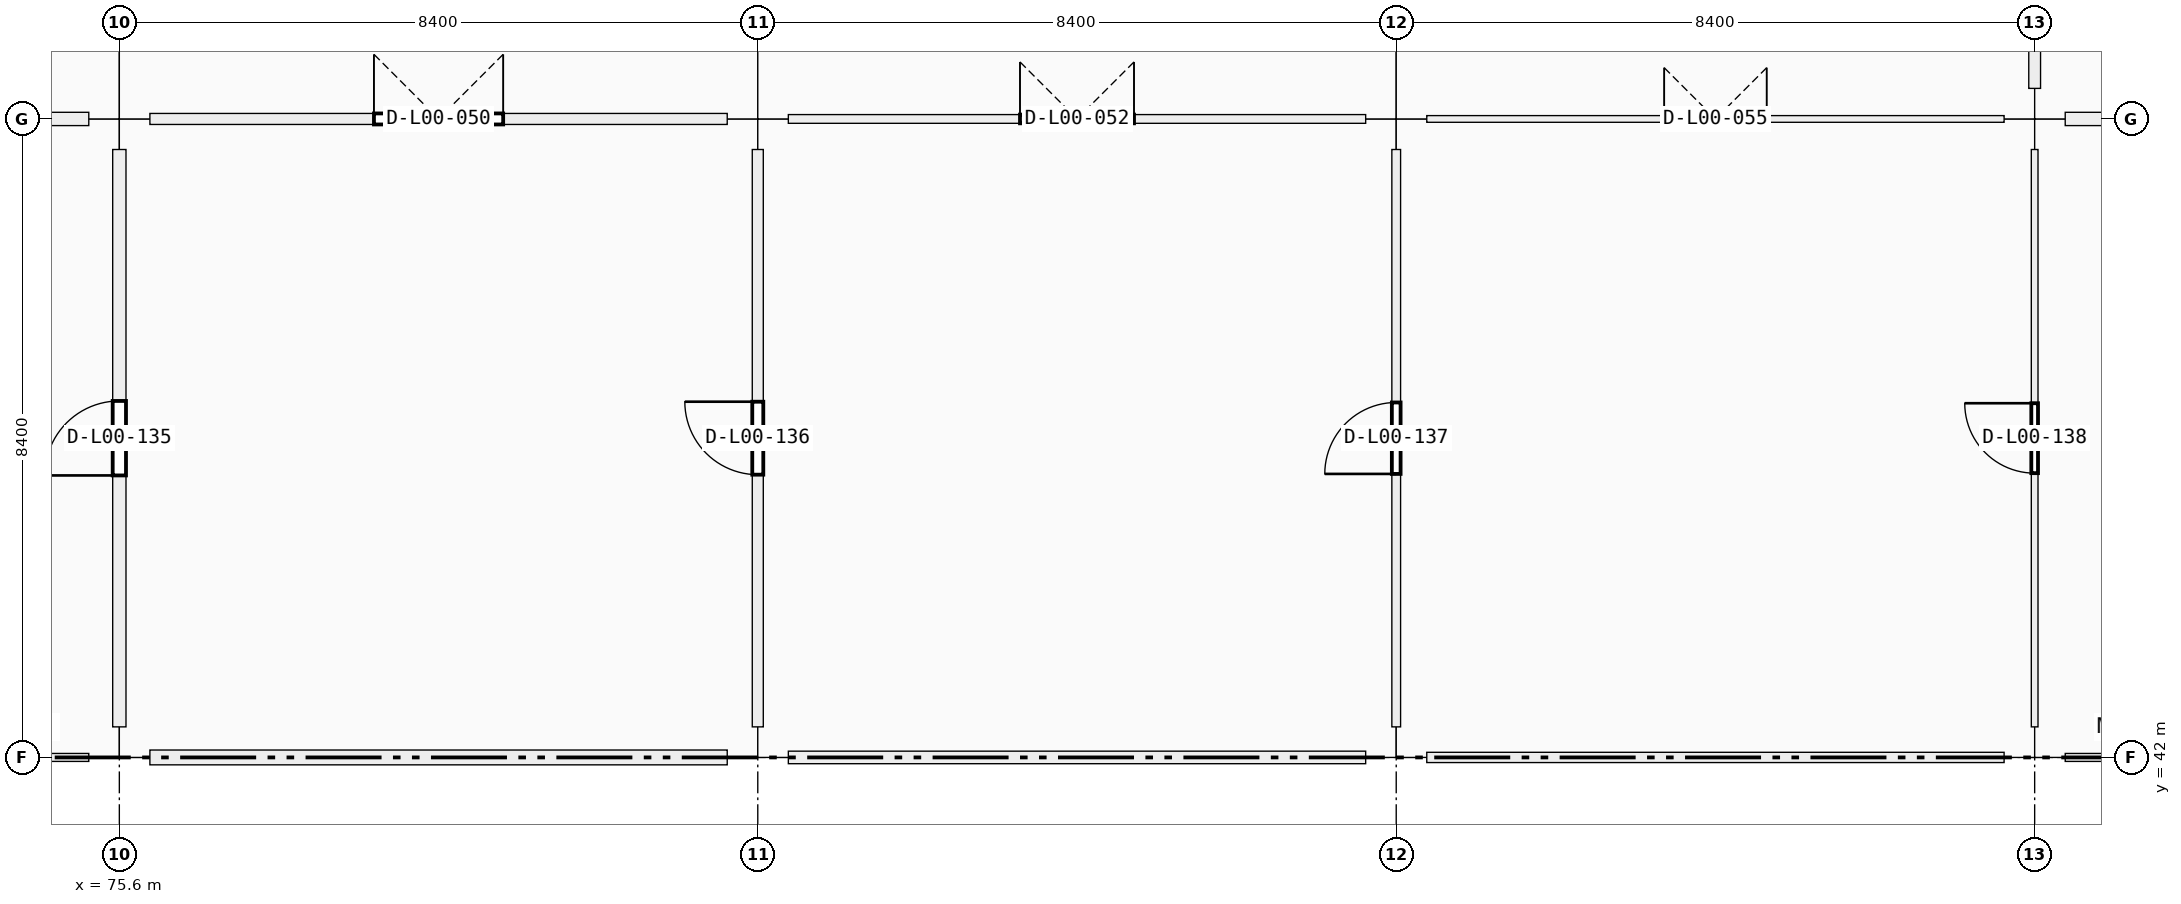
"""IFC4 building model, lengths in metres.
Left out: names, types, materials, properties, quantities, classifications, styles, units other than length and angle.
Written with IfcOpenShell. Run it as: python <this file> out.ifc"""

import sys

from ifc_helpers import new_model, si_unit, direction, frame, frame_2d, origin, origin_2d, place, context, subcontext, project, spatial, rectangle, extrude, element, fill, save


model = new_model("IFC4")
c1 = context("Model", 3, precision=1e-05, world=origin(), true_north=direction((0.0, 1.0)))
c2 = subcontext(c1, "Body", "Model", "MODEL_VIEW")
j1 = project(units=[si_unit("LENGTHUNIT", "METRE"), si_unit("PLANEANGLEUNIT", "RADIAN")], contexts=[c1])
p1 = place(None, origin())
s1 = spatial("IfcSite", under=j1, at=p1, CompositionType="ELEMENT")
p2 = place(p1, origin())
s2 = spatial("IfcBuilding", under=s1, at=p2, CompositionType="ELEMENT")
p3 = place(p2, origin())
s3 = spatial("IfcBuildingStorey", under=s2, at=p3, CompositionType="ELEMENT", Elevation=0.0)
for number, where, z_axis, x_axis in (
    (1, (75.6, 42.0, 0.0), (0.0, 0.0, 1.0), (1.0, 0.0, 0.0)),
    (2, (75.6, 50.4, 0.0), (0.0, 0.0, 1.0), (1.0, 0.0, 0.0)),
    (3, (84.0, 42.0, 0.0), (0.0, 0.0, 1.0), (1.0, 0.0, 0.0)),
    (4, (84.0, 50.4, 0.0), (0.0, 0.0, 1.0), (1.0, 0.0, 0.0)),
    (5, (92.4, 42.0, 0.0), (0.0, 0.0, 1.0), (1.0, 0.0, 0.0)),
    (6, (92.4, 50.4, 0.0), (0.0, 0.0, 1.0), (1.0, 0.0, 0.0)),
    (7, (100.8, 42.0, 0.0), (0.0, 0.0, 1.0), (1.0, 0.0, 0.0)),
    (8, (100.8, 50.4, 0.0), (0.0, 0.0, 1.0), (1.0, 0.0, 0.0)),
):
    element("IfcColumn", number, at=place(p3, frame(where, z_axis=z_axis, x_axis=x_axis)), inside=s3, PredefinedType="COLUMN", context=c2, shape_type="SweptSolid", body=[
        extrude(rectangle(XDim=0.8, YDim=0.8, at=origin_2d()), origin(), (0.0, 0.0, 1.0), 5.76),
    ])
p4 = place(p3, frame((67.602, 42.0, 0.0), z_axis=(0.0, 0.0, 1.0), x_axis=(1.0, 0.0, 0.0)))
e9 = element("IfcWall", 9, at=p4, inside=s3, PredefinedType="PARTITIONING", context=c2, shape_type="SweptSolid", body=[
    extrude(rectangle(XDim=7.596, YDim=0.105, at=frame_2d((3.798, 0.0))), origin(), (0.0, 0.0, 1.0), 3.66),
])
p5 = place(p4, frame((3.098, 0.0, 0.0)))
e10 = element("IfcOpeningElement", 10, at=p5, cuts=e9, PredefinedType="OPENING", context=c2, shape_type="SweptSolid", body=[
    extrude(rectangle(XDim=1.4, YDim=2.25, at=frame_2d((0.7, 1.125))), frame((0.0, 0.052, 0.0), z_axis=(0.0, -1.0, 0.0), x_axis=(1.0, 0.0, 0.0)), (0.0, 0.0, 1.0), 0.105),
])
p6 = place(p3, frame((67.602, 50.4, 0.0), z_axis=(0.0, 0.0, 1.0), x_axis=(1.0, 0.0, 0.0)))
e11 = element("IfcWall", 11, at=p6, inside=s3, PredefinedType="PARTITIONING", context=c2, shape_type="SweptSolid", body=[
    extrude(rectangle(XDim=7.596, YDim=0.175, at=frame_2d((3.798, 0.0))), origin(), (0.0, 0.0, 1.0), 3.66),
])
p7 = place(p6, frame((3.123, 0.0, 0.0)))
e12 = element("IfcOpeningElement", 12, at=p7, cuts=e11, PredefinedType="OPENING", context=c2, shape_type="SweptSolid", body=[
    extrude(rectangle(XDim=1.35, YDim=2.2, at=frame_2d((0.675, 1.1))), frame((0.0, 0.087, 0.0), z_axis=(0.0, -1.0, 0.0), x_axis=(1.0, 0.0, 0.0)), (0.0, 0.0, 1.0), 0.175),
])
p8 = place(p3, frame((76.002, 42.0, 0.0), z_axis=(0.0, 0.0, 1.0), x_axis=(1.0, 0.0, 0.0)))
e13 = element("IfcWall", 13, at=p8, inside=s3, PredefinedType="PARTITIONING", context=c2, shape_type="SweptSolid", body=[
    extrude(rectangle(XDim=7.596, YDim=0.195, at=frame_2d((3.798, 0.0))), origin(), (0.0, 0.0, 1.0), 3.66),
])
p9 = place(p8, frame((2.898, 0.0, 0.0)))
e14 = element("IfcOpeningElement", 14, at=p9, cuts=e13, PredefinedType="OPENING", context=c2, shape_type="SweptSolid", body=[
    extrude(rectangle(XDim=1.8, YDim=2.4, at=frame_2d((0.9, 1.2))), frame((0.0, 0.098, 0.0), z_axis=(0.0, -1.0, 0.0), x_axis=(1.0, 0.0, 0.0)), (0.0, 0.0, 1.0), 0.195),
])
p10 = place(p3, frame((76.002, 50.4, 0.0), z_axis=(0.0, 0.0, 1.0), x_axis=(1.0, 0.0, 0.0)))
e15 = element("IfcWall", 15, at=p10, inside=s3, PredefinedType="PARTITIONING", context=c2, shape_type="SweptSolid", body=[
    extrude(rectangle(XDim=7.596, YDim=0.145, at=frame_2d((3.798, 0.0))), origin(), (0.0, 0.0, 1.0), 3.66),
])
p11 = place(p10, frame((2.948, 0.0, 0.0)))
e16 = element("IfcOpeningElement", 16, at=p11, cuts=e15, PredefinedType="OPENING", context=c2, shape_type="SweptSolid", body=[
    extrude(rectangle(XDim=1.7, YDim=2.35, at=frame_2d((0.85, 1.175))), frame((0.0, 0.073, 0.0), z_axis=(0.0, -1.0, 0.0), x_axis=(1.0, 0.0, 0.0)), (0.0, 0.0, 1.0), 0.145),
])
p12 = place(p3, frame((84.402, 42.0, 0.0), z_axis=(0.0, 0.0, 1.0), x_axis=(1.0, 0.0, 0.0)))
e17 = element("IfcWall", 17, at=p12, inside=s3, PredefinedType="PARTITIONING", context=c2, shape_type="SweptSolid", body=[
    extrude(rectangle(XDim=7.596, YDim=0.165, at=frame_2d((3.798, 0.0))), origin(), (0.0, 0.0, 1.0), 3.66),
])
p13 = place(p12, frame((2.998, 0.0, 0.0)))
e18 = element("IfcOpeningElement", 18, at=p13, cuts=e17, PredefinedType="OPENING", context=c2, shape_type="SweptSolid", body=[
    extrude(rectangle(XDim=1.6, YDim=2.3, at=frame_2d((0.8, 1.15))), frame((0.0, 0.083, 0.0), z_axis=(0.0, -1.0, 0.0), x_axis=(1.0, 0.0, 0.0)), (0.0, 0.0, 1.0), 0.165),
])
p14 = place(p3, frame((84.402, 50.4, 0.0), z_axis=(0.0, 0.0, 1.0), x_axis=(1.0, 0.0, 0.0)))
e19 = element("IfcWall", 19, at=p14, inside=s3, PredefinedType="PARTITIONING", context=c2, shape_type="SweptSolid", body=[
    extrude(rectangle(XDim=7.596, YDim=0.115, at=frame_2d((3.798, 0.0))), origin(), (0.0, 0.0, 1.0), 3.66),
])
p15 = place(p14, frame((3.048, 0.0, 0.0)))
e20 = element("IfcOpeningElement", 20, at=p15, cuts=e19, PredefinedType="OPENING", context=c2, shape_type="SweptSolid", body=[
    extrude(rectangle(XDim=1.5, YDim=2.25, at=frame_2d((0.75, 1.125))), frame((0.0, 0.058, 0.0), z_axis=(0.0, -1.0, 0.0), x_axis=(1.0, 0.0, 0.0)), (0.0, 0.0, 1.0), 0.115),
])
p16 = place(p3, frame((92.802, 42.0, 0.0), z_axis=(0.0, 0.0, 1.0), x_axis=(1.0, 0.0, 0.0)))
e21 = element("IfcWall", 21, at=p16, inside=s3, PredefinedType="PARTITIONING", context=c2, shape_type="SweptSolid", body=[
    extrude(rectangle(XDim=7.596, YDim=0.135, at=frame_2d((3.798, 0.0))), origin(), (0.0, 0.0, 1.0), 3.66),
])
p17 = place(p16, frame((3.098, 0.0, 0.0)))
e22 = element("IfcOpeningElement", 22, at=p17, cuts=e21, PredefinedType="OPENING", context=c2, shape_type="SweptSolid", body=[
    extrude(rectangle(XDim=1.4, YDim=2.25, at=frame_2d((0.7, 1.125))), frame((0.0, 0.067, 0.0), z_axis=(0.0, -1.0, 0.0), x_axis=(1.0, 0.0, 0.0)), (0.0, 0.0, 1.0), 0.135),
])
p18 = place(p3, frame((92.802, 50.4, 0.0), z_axis=(0.0, 0.0, 1.0), x_axis=(1.0, 0.0, 0.0)))
e23 = element("IfcWall", 23, at=p18, inside=s3, PredefinedType="PARTITIONING", context=c2, shape_type="SweptSolid", body=[
    extrude(rectangle(XDim=7.596, YDim=0.088, at=frame_2d((3.798, 0.0))), origin(), (0.0, 0.0, 1.0), 3.66),
])
p19 = place(p18, frame((3.123, 0.0, 0.0)))
e24 = element("IfcOpeningElement", 24, at=p19, cuts=e23, PredefinedType="OPENING", context=c2, shape_type="SweptSolid", body=[
    extrude(rectangle(XDim=1.35, YDim=2.2, at=frame_2d((0.675, 1.1))), frame((0.0, 0.044, 0.0), z_axis=(0.0, -1.0, 0.0), x_axis=(1.0, 0.0, 0.0)), (0.0, 0.0, 1.0), 0.088),
])
p20 = place(p3, frame((101.202, 42.0, 0.0), z_axis=(0.0, 0.0, 1.0), x_axis=(1.0, 0.0, 0.0)))
e25 = element("IfcWall", 25, at=p20, inside=s3, PredefinedType="PARTITIONING", context=c2, shape_type="SweptSolid", body=[
    extrude(rectangle(XDim=7.596, YDim=0.105, at=frame_2d((3.798, 0.0))), origin(), (0.0, 0.0, 1.0), 3.66),
])
p21 = place(p20, frame((2.898, 0.0, 0.0)))
e26 = element("IfcOpeningElement", 26, at=p21, cuts=e25, PredefinedType="OPENING", context=c2, shape_type="SweptSolid", body=[
    extrude(rectangle(XDim=1.8, YDim=2.4, at=frame_2d((0.9, 1.2))), frame((0.0, 0.052, 0.0), z_axis=(0.0, -1.0, 0.0), x_axis=(1.0, 0.0, 0.0)), (0.0, 0.0, 1.0), 0.105),
])
p22 = place(p3, frame((101.202, 50.4, 0.0), z_axis=(0.0, 0.0, 1.0), x_axis=(1.0, 0.0, 0.0)))
e27 = element("IfcWall", 27, at=p22, inside=s3, PredefinedType="PARTITIONING", context=c2, shape_type="SweptSolid", body=[
    extrude(rectangle(XDim=7.596, YDim=0.175, at=frame_2d((3.798, 0.0))), origin(), (0.0, 0.0, 1.0), 3.66),
])
p23 = place(p22, frame((2.948, 0.0, 0.0)))
e28 = element("IfcOpeningElement", 28, at=p23, cuts=e27, PredefinedType="OPENING", context=c2, shape_type="SweptSolid", body=[
    extrude(rectangle(XDim=1.7, YDim=2.35, at=frame_2d((0.85, 1.175))), frame((0.0, 0.087, 0.0), z_axis=(0.0, -1.0, 0.0), x_axis=(1.0, 0.0, 0.0)), (0.0, 0.0, 1.0), 0.175),
])
p24 = place(p3, frame((75.6, 42.402, 0.0), z_axis=(0.0, 0.0, 1.0), x_axis=(0.0, 1.0, 0.0)))
e29 = element("IfcWall", 29, at=p24, inside=s3, PredefinedType="PARTITIONING", context=c2, shape_type="SweptSolid", body=[
    extrude(rectangle(XDim=7.596, YDim=0.175, at=frame_2d((3.798, 0.0))), origin(), (0.0, 0.0, 1.0), 3.66),
])
p25 = place(p24, frame((3.308, 0.0, 0.0)))
e30 = element("IfcOpeningElement", 30, at=p25, cuts=e29, PredefinedType="OPENING", context=c2, shape_type="SweptSolid", body=[
    extrude(rectangle(XDim=0.98, YDim=2.18, at=frame_2d((0.49, 1.09))), frame((0.0, 0.087, 0.0), z_axis=(0.0, -1.0, 0.0), x_axis=(1.0, 0.0, 0.0)), (0.0, 0.0, 1.0), 0.175),
])
p26 = place(p3, frame((84.0, 42.402, 0.0), z_axis=(0.0, 0.0, 1.0), x_axis=(0.0, 1.0, 0.0)))
e31 = element("IfcWall", 31, at=p26, inside=s3, PredefinedType="PARTITIONING", context=c2, shape_type="SweptSolid", body=[
    extrude(rectangle(XDim=7.596, YDim=0.145, at=frame_2d((3.798, 0.0))), origin(), (0.0, 0.0, 1.0), 3.66),
])
p27 = place(p26, frame((3.318, 0.0, 0.0)))
e32 = element("IfcOpeningElement", 32, at=p27, cuts=e31, PredefinedType="OPENING", context=c2, shape_type="SweptSolid", body=[
    extrude(rectangle(XDim=0.96, YDim=2.18, at=frame_2d((0.48, 1.09))), frame((0.0, 0.073, 0.0), z_axis=(0.0, -1.0, 0.0), x_axis=(1.0, 0.0, 0.0)), (0.0, 0.0, 1.0), 0.145),
])
p28 = place(p3, frame((92.4, 42.402, 0.0), z_axis=(0.0, 0.0, 1.0), x_axis=(0.0, 1.0, 0.0)))
e33 = element("IfcWall", 33, at=p28, inside=s3, PredefinedType="PARTITIONING", context=c2, shape_type="SweptSolid", body=[
    extrude(rectangle(XDim=7.596, YDim=0.115, at=frame_2d((3.798, 0.0))), origin(), (0.0, 0.0, 1.0), 3.66),
])
p29 = place(p28, frame((3.328, 0.0, 0.0)))
e34 = element("IfcOpeningElement", 34, at=p29, cuts=e33, PredefinedType="OPENING", context=c2, shape_type="SweptSolid", body=[
    extrude(rectangle(XDim=0.94, YDim=2.15, at=frame_2d((0.47, 1.075))), frame((0.0, 0.058, 0.0), z_axis=(0.0, -1.0, 0.0), x_axis=(1.0, 0.0, 0.0)), (0.0, 0.0, 1.0), 0.115),
])
p30 = place(p3, frame((100.8, 42.402, 0.0), z_axis=(0.0, 0.0, 1.0), x_axis=(0.0, 1.0, 0.0)))
e35 = element("IfcWall", 35, at=p30, inside=s3, PredefinedType="PARTITIONING", context=c2, shape_type="SweptSolid", body=[
    extrude(rectangle(XDim=7.596, YDim=0.088, at=frame_2d((3.798, 0.0))), origin(), (0.0, 0.0, 1.0), 3.66),
])
p31 = place(p30, frame((3.338, 0.0, 0.0)))
e36 = element("IfcOpeningElement", 36, at=p31, cuts=e35, PredefinedType="OPENING", context=c2, shape_type="SweptSolid", body=[
    extrude(rectangle(XDim=0.92, YDim=2.15, at=frame_2d((0.46, 1.075))), frame((0.0, 0.044, 0.0), z_axis=(0.0, -1.0, 0.0), x_axis=(1.0, 0.0, 0.0)), (0.0, 0.0, 1.0), 0.088),
])
p32 = place(p3, frame((100.8, 50.802, 0.0), z_axis=(0.0, 0.0, 1.0), x_axis=(0.0, 1.0, 0.0)))
e37 = element("IfcWall", 37, at=p32, inside=s3, PredefinedType="PARTITIONING", context=c2, shape_type="SweptSolid", body=[
    extrude(rectangle(XDim=7.934, YDim=0.155, at=frame_2d((3.967, 0.0))), origin(), (0.0, 0.0, 1.0), 3.66),
])
p33 = place(p32, frame((3.267, 0.0, 0.0)))
e38 = element("IfcOpeningElement", 38, at=p33, cuts=e37, PredefinedType="OPENING", context=c2, shape_type="SweptSolid", body=[
    extrude(rectangle(XDim=1.4, YDim=2.25, at=frame_2d((0.7, 1.125))), frame((0.0, 0.078, 0.0), z_axis=(0.0, -1.0, 0.0), x_axis=(1.0, 0.0, 0.0)), (0.0, 0.0, 1.0), 0.155),
])
p34 = place(p9, origin())
e39 = element("IfcDoor", 39, at=p34, inside=s3, OperationType="DOUBLE_DOOR_SINGLE_SWING", PredefinedType="DOOR", context=c2, shape_type="SweptSolid", body=[
    extrude(rectangle(XDim=1.8, YDim=2.4, at=frame_2d((0.9, 1.2))), frame((0.0, 0.025, 0.0), z_axis=(0.0, -1.0, 0.0), x_axis=(1.0, 0.0, 0.0)), (0.0, 0.0, 1.0), 0.05),
])
fill(e14, e39)
p35 = place(p11, origin())
e40 = element("IfcDoor", 40, at=p35, inside=s3, OperationType="DOUBLE_DOOR_SINGLE_SWING", PredefinedType="DOOR", context=c2, shape_type="SweptSolid", body=[
    extrude(rectangle(XDim=1.7, YDim=2.35, at=frame_2d((0.85, 1.175))), frame((0.0, 0.025, 0.0), z_axis=(0.0, -1.0, 0.0), x_axis=(1.0, 0.0, 0.0)), (0.0, 0.0, 1.0), 0.05),
])
fill(e16, e40)
p36 = place(p13, origin())
e41 = element("IfcDoor", 41, at=p36, inside=s3, OperationType="DOUBLE_DOOR_SINGLE_SWING", PredefinedType="DOOR", context=c2, shape_type="SweptSolid", body=[
    extrude(rectangle(XDim=1.6, YDim=2.3, at=frame_2d((0.8, 1.15))), frame((0.0, 0.025, 0.0), z_axis=(0.0, -1.0, 0.0), x_axis=(1.0, 0.0, 0.0)), (0.0, 0.0, 1.0), 0.05),
])
fill(e18, e41)
p37 = place(p15, origin())
e42 = element("IfcDoor", 42, at=p37, inside=s3, OperationType="DOUBLE_DOOR_SINGLE_SWING", PredefinedType="DOOR", context=c2, shape_type="SweptSolid", body=[
    extrude(rectangle(XDim=1.5, YDim=2.25, at=frame_2d((0.75, 1.125))), frame((0.0, 0.025, 0.0), z_axis=(0.0, -1.0, 0.0), x_axis=(1.0, 0.0, 0.0)), (0.0, 0.0, 1.0), 0.05),
])
fill(e20, e42)
p38 = place(p17, origin())
e43 = element("IfcDoor", 43, at=p38, inside=s3, OperationType="DOUBLE_DOOR_SINGLE_SWING", PredefinedType="DOOR", context=c2, shape_type="SweptSolid", body=[
    extrude(rectangle(XDim=1.4, YDim=2.25, at=frame_2d((0.7, 1.125))), frame((0.0, 0.025, 0.0), z_axis=(0.0, -1.0, 0.0), x_axis=(1.0, 0.0, 0.0)), (0.0, 0.0, 1.0), 0.05),
])
fill(e22, e43)
p39 = place(p19, origin())
e44 = element("IfcDoor", 44, at=p39, inside=s3, OperationType="DOUBLE_DOOR_SINGLE_SWING", PredefinedType="DOOR", context=c2, shape_type="SweptSolid", body=[
    extrude(rectangle(XDim=1.35, YDim=2.2, at=frame_2d((0.675, 1.1))), frame((0.0, 0.025, 0.0), z_axis=(0.0, -1.0, 0.0), x_axis=(1.0, 0.0, 0.0)), (0.0, 0.0, 1.0), 0.05),
])
fill(e24, e44)
p40 = place(p25, origin())
e45 = element("IfcDoor", 45, at=p40, inside=s3, OperationType="SINGLE_SWING_LEFT", PredefinedType="DOOR", context=c2, shape_type="SweptSolid", body=[
    extrude(rectangle(XDim=0.98, YDim=2.18, at=frame_2d((0.49, 1.09))), frame((0.0, 0.025, 0.0), z_axis=(0.0, -1.0, 0.0), x_axis=(1.0, 0.0, 0.0)), (0.0, 0.0, 1.0), 0.05),
])
fill(e30, e45)
p41 = place(p27, origin())
e46 = element("IfcDoor", 46, at=p41, inside=s3, OperationType="SINGLE_SWING_RIGHT", PredefinedType="DOOR", context=c2, shape_type="SweptSolid", body=[
    extrude(rectangle(XDim=0.96, YDim=2.18, at=frame_2d((0.48, 1.09))), frame((0.0, 0.025, 0.0), z_axis=(0.0, -1.0, 0.0), x_axis=(1.0, 0.0, 0.0)), (0.0, 0.0, 1.0), 0.05),
])
fill(e32, e46)
p42 = place(p29, origin())
e47 = element("IfcDoor", 47, at=p42, inside=s3, OperationType="SINGLE_SWING_LEFT", PredefinedType="DOOR", context=c2, shape_type="SweptSolid", body=[
    extrude(rectangle(XDim=0.94, YDim=2.15, at=frame_2d((0.47, 1.075))), frame((0.0, 0.025, 0.0), z_axis=(0.0, -1.0, 0.0), x_axis=(1.0, 0.0, 0.0)), (0.0, 0.0, 1.0), 0.05),
])
fill(e34, e47)
p43 = place(p31, origin())
e48 = element("IfcDoor", 48, at=p43, inside=s3, OperationType="SINGLE_SWING_RIGHT", PredefinedType="DOOR", context=c2, shape_type="SweptSolid", body=[
    extrude(rectangle(XDim=0.92, YDim=2.15, at=frame_2d((0.46, 1.075))), frame((0.0, 0.025, 0.0), z_axis=(0.0, -1.0, 0.0), x_axis=(1.0, 0.0, 0.0)), (0.0, 0.0, 1.0), 0.05),
])
fill(e36, e48)
save(model, sys.argv[1])
